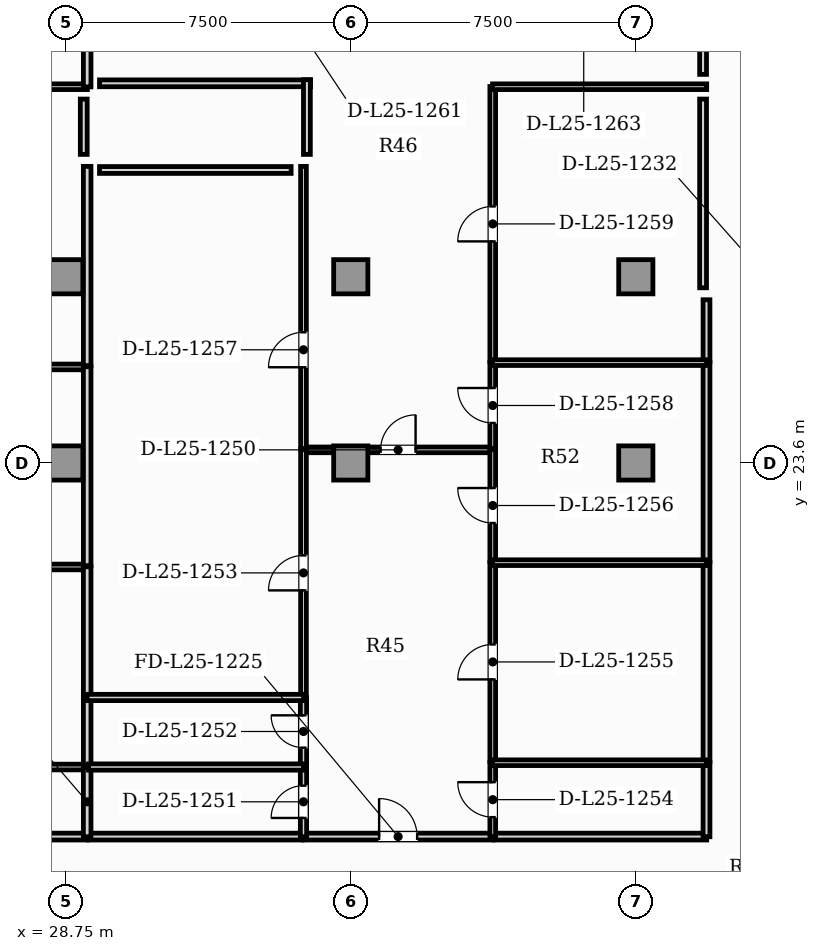
"""IFC4 building model, lengths in metres.
Left out: names, types, materials, properties, quantities, classifications, styles, units other than length and angle.
Written with IfcOpenShell. Run it as: python <this file> out.ifc"""

import sys

from ifc_helpers import new_model, si_unit, direction, frame, frame_2d, origin, origin_2d, place, context, subcontext, project, spatial, rectangle, extrude, element, fill, save


model = new_model("IFC4")
c1 = context("Model", 3, precision=1e-05, world=origin(), true_north=direction((0.0, 1.0)))
c2 = subcontext(c1, "Body", "Model", "MODEL_VIEW")
j1 = project(units=[si_unit("LENGTHUNIT", "METRE"), si_unit("PLANEANGLEUNIT", "RADIAN")], contexts=[c1])
p1 = place(None, origin())
s1 = spatial("IfcSite", under=j1, at=p1, CompositionType="ELEMENT")
p2 = place(p1, origin())
s2 = spatial("IfcBuilding", under=s1, at=p2, CompositionType="ELEMENT")
p3 = place(p2, frame((0.0, 0.0, 104.15)))
s3 = spatial("IfcBuildingStorey", under=s2, at=p3, CompositionType="ELEMENT", Elevation=104.15)
for number, where, z_axis, x_axis in (
    (1, (28.75, 23.6, 0.0), (0.0, 0.0, 1.0), (1.0, 0.0, 0.0)),
    (2, (36.25, 23.6, 0.0), (0.0, 0.0, 1.0), (1.0, 0.0, 0.0)),
    (3, (43.75, 23.6, 0.0), (0.0, 0.0, 1.0), (1.0, 0.0, 0.0)),
    (4, (28.75, 28.5, 0.0), (0.0, 0.0, 1.0), (1.0, 0.0, 0.0)),
    (5, (36.25, 28.5, 0.0), (0.0, 0.0, 1.0), (1.0, 0.0, 0.0)),
    (6, (43.75, 28.5, 0.0), (0.0, 0.0, 1.0), (1.0, 0.0, 0.0)),
):
    element("IfcColumn", number, at=place(p3, frame(where, z_axis=z_axis, x_axis=x_axis)), inside=s3, PredefinedType="COLUMN", context=c2, shape_type="SweptSolid", body=[
        extrude(rectangle(XDim=0.9, YDim=0.9, at=origin_2d()), origin(), (0.0, 0.0, 1.0), 3.85),
    ])
p4 = place(p3, frame((23.055, 13.77, 0.0), z_axis=(0.0, 0.0, 1.0), x_axis=(1.0, 0.0, 0.0)))
e7 = element("IfcWall", 7, at=p4, inside=s3, PredefinedType="PARTITIONING", context=c2, shape_type="SweptSolid", body=[
    extrude(rectangle(XDim=6.264, YDim=0.18, at=frame_2d((3.132, 0.0))), origin(), (0.0, 0.0, 1.0), 3.6),
])
p5 = place(p3, frame((35.0, 13.77, 0.0), z_axis=(0.0, 0.0, 1.0), x_axis=(1.0, 0.0, 0.0)))
e8 = element("IfcWall", 8, at=p5, inside=s3, PredefinedType="PARTITIONING", context=c2, shape_type="SweptSolid", body=[
    extrude(rectangle(XDim=4.99, YDim=0.18, at=frame_2d((2.495, 0.0))), origin(), (0.0, 0.0, 1.0), 3.6),
])
p6 = place(p5, frame((1.995, 0.0, 0.0)))
e9 = element("IfcOpeningElement", 9, at=p6, cuts=e8, PredefinedType="OPENING", context=c2, shape_type="SweptSolid", body=[
    extrude(rectangle(XDim=1.0, YDim=2.15, at=frame_2d((0.5, 1.075))), frame((0.0, 0.1, 0.0), z_axis=(0.0, -1.0, 0.0), x_axis=(1.0, 0.0, 0.0)), (0.0, 0.0, 1.0), 0.2),
])
p7 = place(p3, frame((29.349, 13.77, 0.0), z_axis=(0.0, 0.0, 1.0), x_axis=(1.0, 0.0, 0.0)))
e10 = element("IfcWall", 10, at=p7, inside=s3, PredefinedType="PARTITIONING", context=c2, shape_type="SweptSolid", body=[
    extrude(rectangle(XDim=5.622, YDim=0.18, at=frame_2d((2.811, 0.0))), origin(), (0.0, 0.0, 1.0), 3.6),
])
p8 = place(p3, frame((40.021, 13.77, 0.0), z_axis=(0.0, 0.0, 1.0), x_axis=(1.0, 0.0, 0.0)))
e11 = element("IfcWall", 11, at=p8, inside=s3, PredefinedType="PARTITIONING", context=c2, shape_type="SweptSolid", body=[
    extrude(rectangle(XDim=5.594, YDim=0.18, at=frame_2d((2.797, 0.0))), origin(), (0.0, 0.0, 1.0), 3.6),
])
p9 = place(p3, frame((45.61, 13.765, 0.0), z_axis=(0.0, 0.0, 1.0), x_axis=(0.0, 1.0, 0.0)))
e12 = element("IfcWall", 12, at=p9, inside=s3, PredefinedType="PARTITIONING", context=c2, shape_type="SweptSolid", body=[
    extrude(rectangle(XDim=1.953, YDim=0.18, at=frame_2d((0.977, 0.0))), origin(), (0.0, 0.0, 1.0), 3.6),
])
for number, where, z_axis, x_axis in (
    (13, (45.61, 15.748, 0.0), (0.0, 0.0, 1.0), (0.0, 1.0, 0.0)),
    (14, (45.61, 21.012, 0.0), (0.0, 0.0, 1.0), (0.0, 1.0, 0.0)),
):
    element("IfcWall", number, at=place(p3, frame(where, z_axis=z_axis, x_axis=x_axis)), inside=s3, PredefinedType="PARTITIONING", context=c2, shape_type="SweptSolid", body=[
        extrude(rectangle(XDim=5.234, YDim=0.18, at=frame_2d((2.617, 0.0))), origin(), (0.0, 0.0, 1.0), 3.6),
    ])
p10 = place(p3, frame((45.61, 26.276, 0.0), z_axis=(0.0, 0.0, 1.0), x_axis=(0.0, 1.0, 0.0)))
e15 = element("IfcWall", 15, at=p10, inside=s3, PredefinedType="PARTITIONING", context=c2, shape_type="SweptSolid", body=[
    extrude(rectangle(XDim=1.619, YDim=0.18, at=frame_2d((0.81, 0.0))), origin(), (0.0, 0.0, 1.0), 3.6),
])
p11 = place(p3, frame((23.015, 33.5, 0.0), z_axis=(0.0, 0.0, 1.0), x_axis=(1.0, 0.0, 0.0)))
e16 = element("IfcWall", 16, at=p11, inside=s3, PredefinedType="PARTITIONING", context=c2, shape_type="SweptSolid", body=[
    extrude(rectangle(XDim=6.304, YDim=0.15, at=frame_2d((3.152, 0.0))), origin(), (0.0, 0.0, 1.0), 3.6),
])
p12 = place(p3, frame((29.314, 33.495, 0.0), z_axis=(0.0, 0.0, 1.0), x_axis=(0.0, 1.0, 0.0)))
e17 = element("IfcWall", 17, at=p12, inside=s3, PredefinedType="PARTITIONING", context=c2, shape_type="SweptSolid", body=[
    extrude(rectangle(XDim=1.51, YDim=0.2, at=frame_2d((0.755, 0.0))), origin(), (0.0, 0.0, 1.0), 3.6),
])
p13 = place(p3, frame((23.015, 15.6, 0.0), z_axis=(0.0, 0.0, 1.0), x_axis=(1.0, 0.0, 0.0)))
e18 = element("IfcWall", 18, at=p13, inside=s3, PredefinedType="PARTITIONING", context=c2, shape_type="SweptSolid", body=[
    extrude(rectangle(XDim=6.304, YDim=0.15, at=frame_2d((3.152, 0.0))), origin(), (0.0, 0.0, 1.0), 3.6),
])
p14 = place(p3, frame((29.314, 13.765, 0.0), z_axis=(0.0, 0.0, 1.0), x_axis=(0.0, 1.0, 0.0)))
e19 = element("IfcWall", 19, at=p14, inside=s3, PredefinedType="PARTITIONING", context=c2, shape_type="SweptSolid", body=[
    extrude(rectangle(XDim=1.84, YDim=0.2, at=frame_2d((0.92, 0.0))), origin(), (0.0, 0.0, 1.0), 3.6),
])
p15 = place(p3, frame((23.015, 20.864, 0.0), z_axis=(0.0, 0.0, 1.0), x_axis=(1.0, 0.0, 0.0)))
e20 = element("IfcWall", 20, at=p15, inside=s3, PredefinedType="PARTITIONING", context=c2, shape_type="SweptSolid", body=[
    extrude(rectangle(XDim=6.304, YDim=0.15, at=frame_2d((3.152, 0.0))), origin(), (0.0, 0.0, 1.0), 3.6),
])
p16 = place(p3, frame((29.314, 15.635, 0.0), z_axis=(0.0, 0.0, 1.0), x_axis=(0.0, 1.0, 0.0)))
e21 = element("IfcWall", 21, at=p16, inside=s3, PredefinedType="PARTITIONING", context=c2, shape_type="SweptSolid", body=[
    extrude(rectangle(XDim=1.8, YDim=0.2, at=frame_2d((0.9, 0.0))), origin(), (0.0, 0.0, 1.0), 3.6),
])
p17 = place(p3, frame((29.314, 17.465, 0.0), z_axis=(0.0, 0.0, 1.0), x_axis=(0.0, 1.0, 0.0)))
e22 = element("IfcWall", 22, at=p17, inside=s3, PredefinedType="PARTITIONING", context=c2, shape_type="SweptSolid", body=[
    extrude(rectangle(XDim=3.404, YDim=0.2, at=frame_2d((1.702, 0.0))), origin(), (0.0, 0.0, 1.0), 3.6),
])
p18 = place(p3, frame((23.015, 26.127, 0.0), z_axis=(0.0, 0.0, 1.0), x_axis=(1.0, 0.0, 0.0)))
e23 = element("IfcWall", 23, at=p18, inside=s3, PredefinedType="PARTITIONING", context=c2, shape_type="SweptSolid", body=[
    extrude(rectangle(XDim=6.304, YDim=0.15, at=frame_2d((3.152, 0.0))), origin(), (0.0, 0.0, 1.0), 3.6),
])
p19 = place(p3, frame((29.314, 20.899, 0.0), z_axis=(0.0, 0.0, 1.0), x_axis=(0.0, 1.0, 0.0)))
e24 = element("IfcWall", 24, at=p19, inside=s3, PredefinedType="PARTITIONING", context=c2, shape_type="SweptSolid", body=[
    extrude(rectangle(XDim=5.234, YDim=0.2, at=frame_2d((2.617, 0.0))), origin(), (0.0, 0.0, 1.0), 3.6),
])
p20 = place(p3, frame((29.314, 26.162, 0.0), z_axis=(0.0, 0.0, 1.0), x_axis=(0.0, 1.0, 0.0)))
e25 = element("IfcWall", 25, at=p20, inside=s3, PredefinedType="PARTITIONING", context=c2, shape_type="SweptSolid", body=[
    extrude(rectangle(XDim=5.242, YDim=0.2, at=frame_2d((2.621, 0.0))), origin(), (0.0, 0.0, 1.0), 3.6),
])
p21 = place(p3, frame((35.0, 23.945, 0.0), z_axis=(0.0, 0.0, 1.0), x_axis=(1.0, 0.0, 0.0)))
e26 = element("IfcWall", 26, at=p21, inside=s3, PredefinedType="PARTITIONING", context=c2, shape_type="SweptSolid", body=[
    extrude(rectangle(XDim=4.99, YDim=0.15, at=frame_2d((2.495, 0.0))), origin(), (0.0, 0.0, 1.0), 3.6),
])
p22 = place(p21, frame((2.035, 0.0, 0.0)))
e27 = element("IfcOpeningElement", 27, at=p22, cuts=e26, PredefinedType="OPENING", context=c2, shape_type="SweptSolid", body=[
    extrude(rectangle(XDim=0.92, YDim=2.1, at=frame_2d((0.46, 1.05))), frame((0.0, 0.085, 0.0), z_axis=(0.0, -1.0, 0.0), x_axis=(1.0, 0.0, 0.0)), (0.0, 0.0, 1.0), 0.17),
])
p23 = place(p3, frame((35.006, 13.765, 0.0), z_axis=(0.0, 0.0, 1.0), x_axis=(0.0, 1.0, 0.0)))
e28 = element("IfcWall", 28, at=p23, inside=s3, PredefinedType="PLUMBINGWALL", context=c2, shape_type="SweptSolid", body=[
    extrude(rectangle(XDim=1.84, YDim=0.165, at=frame_2d((0.92, 0.0))), origin(), (0.0, 0.0, 1.0), 3.6),
])
p24 = place(p23, frame((0.495, 0.0, 0.0)))
e29 = element("IfcOpeningElement", 29, at=p24, cuts=e28, PredefinedType="OPENING", context=c2, shape_type="SweptSolid", body=[
    extrude(rectangle(XDim=0.85, YDim=2.1, at=frame_2d((0.425, 1.05))), frame((0.0, 0.093, 0.0), z_axis=(0.0, -1.0, 0.0), x_axis=(1.0, 0.0, 0.0)), (0.0, 0.0, 1.0), 0.185),
])
p25 = place(p3, frame((35.006, 15.635, 0.0), z_axis=(0.0, 0.0, 1.0), x_axis=(0.0, 1.0, 0.0)))
e30 = element("IfcWall", 30, at=p25, inside=s3, PredefinedType="PLUMBINGWALL", context=c2, shape_type="SweptSolid", body=[
    extrude(rectangle(XDim=1.8, YDim=0.165, at=frame_2d((0.9, 0.0))), origin(), (0.0, 0.0, 1.0), 3.6),
])
p26 = place(p25, frame((0.475, 0.0, 0.0)))
e31 = element("IfcOpeningElement", 31, at=p26, cuts=e30, PredefinedType="OPENING", context=c2, shape_type="SweptSolid", body=[
    extrude(rectangle(XDim=0.85, YDim=2.1, at=frame_2d((0.425, 1.05))), frame((0.0, 0.093, 0.0), z_axis=(0.0, -1.0, 0.0), x_axis=(1.0, 0.0, 0.0)), (0.0, 0.0, 1.0), 0.185),
])
p27 = place(p3, frame((35.006, 17.465, 0.0), z_axis=(0.0, 0.0, 1.0), x_axis=(0.0, 1.0, 0.0)))
e32 = element("IfcWall", 32, at=p27, inside=s3, PredefinedType="PARTITIONING", context=c2, shape_type="SweptSolid", body=[
    extrude(rectangle(XDim=6.485, YDim=0.15, at=frame_2d((3.243, 0.0))), origin(), (0.0, 0.0, 1.0), 3.6),
])
p28 = place(p27, frame((2.783, 0.0, 0.0)))
e33 = element("IfcOpeningElement", 33, at=p28, cuts=e32, PredefinedType="OPENING", context=c2, shape_type="SweptSolid", body=[
    extrude(rectangle(XDim=0.92, YDim=2.1, at=frame_2d((0.46, 1.05))), frame((0.0, 0.085, 0.0), z_axis=(0.0, -1.0, 0.0), x_axis=(1.0, 0.0, 0.0)), (0.0, 0.0, 1.0), 0.17),
])
p29 = place(p3, frame((39.986, 13.765, 0.0), z_axis=(0.0, 0.0, 1.0), x_axis=(0.0, 1.0, 0.0)))
e34 = element("IfcWall", 34, at=p29, inside=s3, PredefinedType="PARTITIONING", context=c2, shape_type="SweptSolid", body=[
    extrude(rectangle(XDim=1.953, YDim=0.15, at=frame_2d((0.977, 0.0))), origin(), (0.0, 0.0, 1.0), 3.6),
])
p30 = place(p29, frame((0.517, 0.0, 0.0)))
e35 = element("IfcOpeningElement", 35, at=p30, cuts=e34, PredefinedType="OPENING", context=c2, shape_type="SweptSolid", body=[
    extrude(rectangle(XDim=0.92, YDim=2.1, at=frame_2d((0.46, 1.05))), frame((0.0, 0.085, 0.0), z_axis=(0.0, -1.0, 0.0), x_axis=(1.0, 0.0, 0.0)), (0.0, 0.0, 1.0), 0.17),
])
p31 = place(p3, frame((39.986, 15.748, 0.0), z_axis=(0.0, 0.0, 1.0), x_axis=(0.0, 1.0, 0.0)))
e36 = element("IfcWall", 36, at=p31, inside=s3, PredefinedType="PARTITIONING", context=c2, shape_type="SweptSolid", body=[
    extrude(rectangle(XDim=5.234, YDim=0.15, at=frame_2d((2.617, 0.0))), origin(), (0.0, 0.0, 1.0), 3.6),
])
p32 = place(p31, frame((2.157, 0.0, 0.0)))
e37 = element("IfcOpeningElement", 37, at=p32, cuts=e36, PredefinedType="OPENING", context=c2, shape_type="SweptSolid", body=[
    extrude(rectangle(XDim=0.92, YDim=2.1, at=frame_2d((0.46, 1.05))), frame((0.0, 0.085, 0.0), z_axis=(0.0, -1.0, 0.0), x_axis=(1.0, 0.0, 0.0)), (0.0, 0.0, 1.0), 0.17),
])
p33 = place(p3, frame((39.986, 21.012, 0.0), z_axis=(0.0, 0.0, 1.0), x_axis=(0.0, 1.0, 0.0)))
e38 = element("IfcWall", 38, at=p33, inside=s3, PredefinedType="PARTITIONING", context=c2, shape_type="SweptSolid", body=[
    extrude(rectangle(XDim=2.938, YDim=0.15, at=frame_2d((1.469, 0.0))), origin(), (0.0, 0.0, 1.0), 3.6),
])
p34 = place(p33, frame((1.009, 0.0, 0.0)))
e39 = element("IfcOpeningElement", 39, at=p34, cuts=e38, PredefinedType="OPENING", context=c2, shape_type="SweptSolid", body=[
    extrude(rectangle(XDim=0.92, YDim=2.1, at=frame_2d((0.46, 1.05))), frame((0.0, 0.085, 0.0), z_axis=(0.0, -1.0, 0.0), x_axis=(1.0, 0.0, 0.0)), (0.0, 0.0, 1.0), 0.17),
])
p35 = place(p3, frame((35.006, 23.98, 0.0), z_axis=(0.0, 0.0, 1.0), x_axis=(0.0, 1.0, 0.0)))
e40 = element("IfcWall", 40, at=p35, inside=s3, PredefinedType="PARTITIONING", context=c2, shape_type="SweptSolid", body=[
    extrude(rectangle(XDim=7.424, YDim=0.15, at=frame_2d((3.712, 0.0))), origin(), (0.0, 0.0, 1.0), 3.6),
])
p36 = place(p35, frame((2.138, 0.0, 0.0)))
e41 = element("IfcOpeningElement", 41, at=p36, cuts=e40, PredefinedType="OPENING", context=c2, shape_type="SweptSolid", body=[
    extrude(rectangle(XDim=0.92, YDim=2.1, at=frame_2d((0.46, 1.05))), frame((0.0, 0.085, 0.0), z_axis=(0.0, -1.0, 0.0), x_axis=(1.0, 0.0, 0.0)), (0.0, 0.0, 1.0), 0.17),
])
p37 = place(p3, frame((39.986, 23.98, 0.0), z_axis=(0.0, 0.0, 1.0), x_axis=(0.0, 1.0, 0.0)))
e42 = element("IfcWall", 42, at=p37, inside=s3, PredefinedType="PARTITIONING", context=c2, shape_type="SweptSolid", body=[
    extrude(rectangle(XDim=2.265, YDim=0.15, at=frame_2d((1.133, 0.0))), origin(), (0.0, 0.0, 1.0), 3.6),
])
p38 = place(p37, frame((0.673, 0.0, 0.0)))
e43 = element("IfcOpeningElement", 43, at=p38, cuts=e42, PredefinedType="OPENING", context=c2, shape_type="SweptSolid", body=[
    extrude(rectangle(XDim=0.92, YDim=2.1, at=frame_2d((0.46, 1.05))), frame((0.0, 0.085, 0.0), z_axis=(0.0, -1.0, 0.0), x_axis=(1.0, 0.0, 0.0)), (0.0, 0.0, 1.0), 0.17),
])
p39 = place(p3, frame((39.986, 26.276, 0.0), z_axis=(0.0, 0.0, 1.0), x_axis=(0.0, 1.0, 0.0)))
e44 = element("IfcWall", 44, at=p39, inside=s3, PredefinedType="PARTITIONING", context=c2, shape_type="SweptSolid", body=[
    extrude(rectangle(XDim=7.229, YDim=0.15, at=frame_2d((3.615, 0.0))), origin(), (0.0, 0.0, 1.0), 3.6),
])
p40 = place(p39, frame((3.155, 0.0, 0.0)))
e45 = element("IfcOpeningElement", 45, at=p40, cuts=e44, PredefinedType="OPENING", context=c2, shape_type="SweptSolid", body=[
    extrude(rectangle(XDim=0.92, YDim=2.1, at=frame_2d((0.46, 1.05))), frame((0.0, 0.085, 0.0), z_axis=(0.0, -1.0, 0.0), x_axis=(1.0, 0.0, 0.0)), (0.0, 0.0, 1.0), 0.17),
])
p41 = place(p3, frame((39.981, 33.5, 0.0), z_axis=(0.0, 0.0, 1.0), x_axis=(1.0, 0.0, 0.0)))
e46 = element("IfcWall", 46, at=p41, inside=s3, PredefinedType="PARTITIONING", context=c2, shape_type="SweptSolid", body=[
    extrude(rectangle(XDim=5.634, YDim=0.15, at=frame_2d((2.817, 0.0))), origin(), (0.0, 0.0, 1.0), 3.6),
])
p42 = place(p3, frame((29.349, 15.6, 0.0), z_axis=(0.0, 0.0, 1.0), x_axis=(1.0, 0.0, 0.0)))
e47 = element("IfcWall", 47, at=p42, inside=s3, PredefinedType="PLUMBINGWALL", context=c2, shape_type="SweptSolid", body=[
    extrude(rectangle(XDim=5.661, YDim=0.165, at=frame_2d((2.831, 0.0))), origin(), (0.0, 0.0, 1.0), 3.6),
])
p43 = place(p3, frame((29.309, 17.43, 0.0), z_axis=(0.0, 0.0, 1.0), x_axis=(1.0, 0.0, 0.0)))
e48 = element("IfcWall", 48, at=p43, inside=s3, PredefinedType="PLUMBINGWALL", context=c2, shape_type="SweptSolid", body=[
    extrude(rectangle(XDim=5.701, YDim=0.165, at=frame_2d((2.851, 0.0))), origin(), (0.0, 0.0, 1.0), 3.6),
])
for number, where, z_axis, x_axis in (
    (49, (39.981, 15.713, 0.0), (0.0, 0.0, 1.0), (1.0, 0.0, 0.0)),
    (50, (39.981, 20.977, 0.0), (0.0, 0.0, 1.0), (1.0, 0.0, 0.0)),
    (51, (39.981, 26.241, 0.0), (0.0, 0.0, 1.0), (1.0, 0.0, 0.0)),
):
    element("IfcWall", number, at=place(p3, frame(where, z_axis=z_axis, x_axis=x_axis)), inside=s3, PredefinedType="PARTITIONING", context=c2, shape_type="SweptSolid", body=[
        extrude(rectangle(XDim=5.634, YDim=0.15, at=frame_2d((2.817, 0.0))), origin(), (0.0, 0.0, 1.0), 3.6),
    ])
p44 = place(p3, frame((29.224, 33.175, 0.0), z_axis=(0.0, 0.0, 1.0), x_axis=(0.0, -1.0, 0.0)))
e52 = element("IfcWall", 52, at=p44, inside=s3, PredefinedType="PARTITIONING", context=c2, shape_type="SweptSolid", body=[
    extrude(rectangle(XDim=1.456, YDim=0.18, at=frame_2d((0.728, 0.0))), origin(), (0.0, 0.0, 1.0), 3.6),
])
p45 = place(p3, frame((35.191, 33.59, 0.0), z_axis=(0.0, 0.0, 1.0), x_axis=(-1.0, 0.0, 0.0)))
e53 = element("IfcWall", 53, at=p45, inside=s3, PredefinedType="PARTITIONING", context=c2, shape_type="SweptSolid", body=[
    extrude(rectangle(XDim=5.552, YDim=0.18, at=frame_2d((2.776, 0.0))), origin(), (0.0, 0.0, 1.0), 3.6),
])
p46 = place(p3, frame((45.52, 34.675, 0.0), z_axis=(0.0, 0.0, 1.0), x_axis=(0.0, -1.0, 0.0)))
e54 = element("IfcWall", 54, at=p46, inside=s3, PredefinedType="PARTITIONING", context=c2, shape_type="SweptSolid", body=[
    extrude(rectangle(XDim=0.85, YDim=0.18, at=frame_2d((0.425, 0.0))), origin(), (0.0, 0.0, 1.0), 3.6),
])
p47 = place(p3, frame((35.096, 31.719, 0.0), z_axis=(0.0, 0.0, 1.0), x_axis=(0.0, 1.0, 0.0)))
e55 = element("IfcWall", 55, at=p47, inside=s3, PredefinedType="PARTITIONING", context=c2, shape_type="SweptSolid", body=[
    extrude(rectangle(XDim=1.966, YDim=0.18, at=frame_2d((0.983, 0.0))), origin(), (0.0, 0.0, 1.0), 3.6),
])
p48 = place(p3, frame((29.639, 31.309, 0.0), z_axis=(0.0, 0.0, 1.0), x_axis=(1.0, 0.0, 0.0)))
e56 = element("IfcWall", 56, at=p48, inside=s3, PredefinedType="PARTITIONING", context=c2, shape_type="SweptSolid", body=[
    extrude(rectangle(XDim=5.042, YDim=0.18, at=frame_2d((2.521, 0.0))), origin(), (0.0, 0.0, 1.0), 3.6),
])
p49 = place(p3, frame((45.52, 33.175, 0.0), z_axis=(0.0, 0.0, 1.0), x_axis=(0.0, -1.0, 0.0)))
e57 = element("IfcWall", 57, at=p49, inside=s3, PredefinedType="PARTITIONING", context=c2, shape_type="SweptSolid", body=[
    extrude(rectangle(XDim=4.965, YDim=0.18, at=frame_2d((2.482, 0.0))), origin(), (0.0, 0.0, 1.0), 3.6),
])
p50 = place(p6, origin())
e58 = element("IfcDoor", 58, at=p50, inside=s3, OperationType="SINGLE_SWING_LEFT", PredefinedType="DOOR", context=c2, shape_type="SweptSolid", body=[
    extrude(rectangle(XDim=1.0, YDim=2.15, at=frame_2d((0.5, 1.075))), frame((0.0, 0.025, 0.0), z_axis=(0.0, -1.0, 0.0), x_axis=(1.0, 0.0, 0.0)), (0.0, 0.0, 1.0), 0.05),
])
fill(e9, e58)
p51 = place(p22, origin())
e59 = element("IfcDoor", 59, at=p51, inside=s3, OperationType="SINGLE_SWING_RIGHT", PredefinedType="DOOR", context=c2, shape_type="SweptSolid", body=[
    extrude(rectangle(XDim=0.92, YDim=2.1, at=frame_2d((0.46, 1.05))), frame((0.0, 0.025, 0.0), z_axis=(0.0, -1.0, 0.0), x_axis=(1.0, 0.0, 0.0)), (0.0, 0.0, 1.0), 0.05),
])
fill(e27, e59)
p52 = place(p24, origin())
e60 = element("IfcDoor", 60, at=p52, inside=s3, OperationType="SINGLE_SWING_LEFT", PredefinedType="DOOR", context=c2, shape_type="SweptSolid", body=[
    extrude(rectangle(XDim=0.85, YDim=2.1, at=frame_2d((0.425, 1.05))), frame((0.0, 0.025, 0.0), z_axis=(0.0, -1.0, 0.0), x_axis=(1.0, 0.0, 0.0)), (0.0, 0.0, 1.0), 0.05),
])
fill(e29, e60)
p53 = place(p26, origin())
e61 = element("IfcDoor", 61, at=p53, inside=s3, OperationType="SINGLE_SWING_RIGHT", PredefinedType="DOOR", context=c2, shape_type="SweptSolid", body=[
    extrude(rectangle(XDim=0.85, YDim=2.1, at=frame_2d((0.425, 1.05))), frame((0.0, 0.025, 0.0), z_axis=(0.0, -1.0, 0.0), x_axis=(1.0, 0.0, 0.0)), (0.0, 0.0, 1.0), 0.05),
])
fill(e31, e61)
p54 = place(p28, origin())
e62 = element("IfcDoor", 62, at=p54, inside=s3, OperationType="SINGLE_SWING_LEFT", PredefinedType="DOOR", context=c2, shape_type="SweptSolid", body=[
    extrude(rectangle(XDim=0.92, YDim=2.1, at=frame_2d((0.46, 1.05))), frame((0.0, 0.025, 0.0), z_axis=(0.0, -1.0, 0.0), x_axis=(1.0, 0.0, 0.0)), (0.0, 0.0, 1.0), 0.05),
])
fill(e33, e62)
p55 = place(p30, origin())
e63 = element("IfcDoor", 63, at=p55, inside=s3, OperationType="SINGLE_SWING_RIGHT", PredefinedType="DOOR", context=c2, shape_type="SweptSolid", body=[
    extrude(rectangle(XDim=0.92, YDim=2.1, at=frame_2d((0.46, 1.05))), frame((0.0, 0.025, 0.0), z_axis=(0.0, -1.0, 0.0), x_axis=(1.0, 0.0, 0.0)), (0.0, 0.0, 1.0), 0.05),
])
fill(e35, e63)
p56 = place(p32, origin())
e64 = element("IfcDoor", 64, at=p56, inside=s3, OperationType="SINGLE_SWING_LEFT", PredefinedType="DOOR", context=c2, shape_type="SweptSolid", body=[
    extrude(rectangle(XDim=0.92, YDim=2.1, at=frame_2d((0.46, 1.05))), frame((0.0, 0.025, 0.0), z_axis=(0.0, -1.0, 0.0), x_axis=(1.0, 0.0, 0.0)), (0.0, 0.0, 1.0), 0.05),
])
fill(e37, e64)
p57 = place(p34, origin())
e65 = element("IfcDoor", 65, at=p57, inside=s3, OperationType="SINGLE_SWING_RIGHT", PredefinedType="DOOR", context=c2, shape_type="SweptSolid", body=[
    extrude(rectangle(XDim=0.92, YDim=2.1, at=frame_2d((0.46, 1.05))), frame((0.0, 0.025, 0.0), z_axis=(0.0, -1.0, 0.0), x_axis=(1.0, 0.0, 0.0)), (0.0, 0.0, 1.0), 0.05),
])
fill(e39, e65)
p58 = place(p36, origin())
e66 = element("IfcDoor", 66, at=p58, inside=s3, OperationType="SINGLE_SWING_LEFT", PredefinedType="DOOR", context=c2, shape_type="SweptSolid", body=[
    extrude(rectangle(XDim=0.92, YDim=2.1, at=frame_2d((0.46, 1.05))), frame((0.0, 0.025, 0.0), z_axis=(0.0, -1.0, 0.0), x_axis=(1.0, 0.0, 0.0)), (0.0, 0.0, 1.0), 0.05),
])
fill(e41, e66)
p59 = place(p38, origin())
e67 = element("IfcDoor", 67, at=p59, inside=s3, OperationType="SINGLE_SWING_RIGHT", PredefinedType="DOOR", context=c2, shape_type="SweptSolid", body=[
    extrude(rectangle(XDim=0.92, YDim=2.1, at=frame_2d((0.46, 1.05))), frame((0.0, 0.025, 0.0), z_axis=(0.0, -1.0, 0.0), x_axis=(1.0, 0.0, 0.0)), (0.0, 0.0, 1.0), 0.05),
])
fill(e43, e67)
p60 = place(p40, origin())
e68 = element("IfcDoor", 68, at=p60, inside=s3, OperationType="SINGLE_SWING_LEFT", PredefinedType="DOOR", context=c2, shape_type="SweptSolid", body=[
    extrude(rectangle(XDim=0.92, YDim=2.1, at=frame_2d((0.46, 1.05))), frame((0.0, 0.025, 0.0), z_axis=(0.0, -1.0, 0.0), x_axis=(1.0, 0.0, 0.0)), (0.0, 0.0, 1.0), 0.05),
])
fill(e45, e68)
save(model, sys.argv[1])
